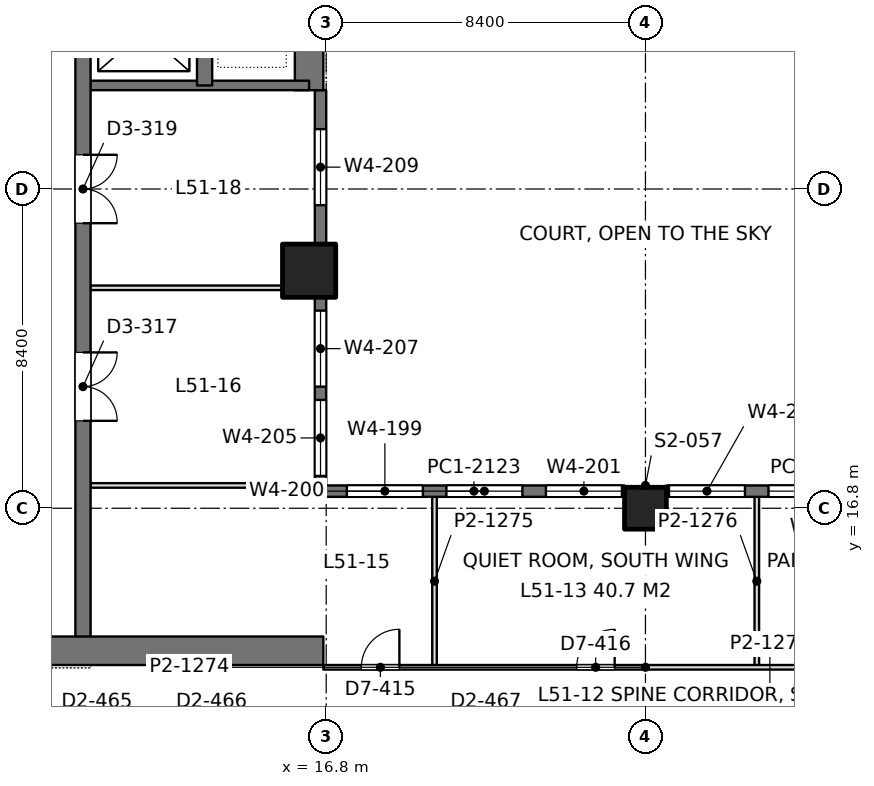
"""IFC4 building model, lengths in metres.
Left out: names, types, materials, properties, quantities, classifications, styles, units other than length and angle.
Written with IfcOpenShell. Run it as: python <this file> out.ifc"""

import sys

from ifc_helpers import new_model, si_unit, direction, frame, frame_2d, origin, origin_2d, place, context, subcontext, project, spatial, rectangle, extrude, element, fill, save


model = new_model("IFC4")
c1 = context("Model", 3, precision=1e-05, world=origin(), true_north=direction((0.0, 1.0)))
c2 = subcontext(c1, "Body", "Model", "MODEL_VIEW")
j1 = project(units=[si_unit("LENGTHUNIT", "METRE"), si_unit("PLANEANGLEUNIT", "RADIAN")], contexts=[c1])
p1 = place(None, origin())
s1 = spatial("IfcSite", under=j1, at=p1, CompositionType="ELEMENT")
p2 = place(p1, origin())
s2 = spatial("IfcBuilding", under=s1, at=p2, CompositionType="ELEMENT")
p3 = place(p2, frame((0.0, 0.0, 223.8)))
s3 = spatial("IfcBuildingStorey", under=s2, at=p3, CompositionType="ELEMENT", Elevation=223.8)
p4 = place(p3, frame((25.2, 16.8, 0.0), z_axis=(0.0, 0.0, 1.0), x_axis=(1.0, 0.0, 0.0)))
e1 = element("IfcColumn", 1, at=p4, inside=s3, PredefinedType="COLUMN", context=c2, shape_type="SweptSolid", body=[
    extrude(rectangle(XDim=1.1, YDim=1.1, at=origin_2d()), origin(), (0.0, 0.0, 1.0), 4.2),
])
p5 = place(p3, frame((16.35, 23.05, 0.0), z_axis=(0.0, 0.0, 1.0), x_axis=(1.0, 0.0, 0.0)))
e2 = element("IfcColumn", 2, at=p5, inside=s3, PredefinedType="COLUMN", context=c2, shape_type="SweptSolid", body=[
    extrude(rectangle(XDim=1.4, YDim=1.4, at=origin_2d()), origin(), (0.0, 0.0, 1.0), 4.2),
])
p6 = place(p3, frame((-1.125, 13.05, 0.0), z_axis=(0.0, 0.0, 1.0), x_axis=(1.0, 0.0, 0.0)))
e3 = element("IfcWall", 3, at=p6, inside=s3, PredefinedType="SHEAR", context=c2, shape_type="SweptSolid", body=[
    extrude(rectangle(XDim=17.85, YDim=0.75, at=frame_2d((8.925, 0.0))), origin(), (0.0, 0.0, 1.0), 4.2),
])
p7 = place(p6, frame((8.875, 0.0, 0.0)))
e4 = element("IfcOpeningElement", 4, at=p7, cuts=e3, PredefinedType="OPENING", context=c2, shape_type="SweptSolid", body=[
    extrude(rectangle(XDim=1.8, YDim=2.4, at=frame_2d((0.9, 1.2))), frame((0.0, 0.385, 0.0), z_axis=(0.0, -1.0, 0.0), x_axis=(1.0, 0.0, 0.0)), (0.0, 0.0, 1.0), 0.77),
])
p8 = place(p3, frame((16.35, 27.8, 0.0), z_axis=(0.0, 0.0, 1.0), x_axis=(0.0, 1.0, 0.0)))
e5 = element("IfcWall", 5, at=p8, inside=s3, PredefinedType="SHEAR", context=c2, shape_type="SweptSolid", body=[
    extrude(rectangle(XDim=9.55, YDim=0.75, at=frame_2d((4.775, 0.0))), origin(), (0.0, 0.0, 1.0), 4.2),
])
p9 = place(p3, frame((10.4, 13.05, 0.0), z_axis=(0.0, 0.0, 1.0), x_axis=(0.0, 1.0, 0.0)))
e6 = element("IfcWall", 6, at=p9, inside=s3, PredefinedType="SHEAR", context=c2, shape_type="SweptSolid", body=[
    extrude(rectangle(XDim=24.3, YDim=0.4, at=frame_2d((12.15, 0.0))), origin(), (0.0, 0.0, 1.0), 4.2),
])
p10 = place(p9, frame((15.75, 0.0, 0.0)))
e7 = element("IfcOpeningElement", 7, at=p10, cuts=e6, PredefinedType="OPENING", context=c2, shape_type="SweptSolid", body=[
    extrude(rectangle(XDim=1.1, YDim=2.2, at=frame_2d((0.55, 1.1))), frame((0.0, 0.21, 0.0), z_axis=(0.0, -1.0, 0.0), x_axis=(1.0, 0.0, 0.0)), (0.0, 0.0, 1.0), 0.42),
])
p11 = place(p9, frame((18.6, 0.0, 0.0)))
e8 = element("IfcOpeningElement", 8, at=p11, cuts=e6, PredefinedType="OPENING", context=c2, shape_type="SweptSolid", body=[
    extrude(rectangle(XDim=1.1, YDim=2.2, at=frame_2d((0.55, 1.1))), frame((0.0, 0.21, 0.0), z_axis=(0.0, -1.0, 0.0), x_axis=(1.0, 0.0, 0.0)), (0.0, 0.0, 1.0), 0.42),
])
p12 = place(p9, frame((21.45, 0.0, 0.0)))
e9 = element("IfcOpeningElement", 9, at=p12, cuts=e6, PredefinedType="OPENING", context=c2, shape_type="SweptSolid", body=[
    extrude(rectangle(XDim=1.1, YDim=2.2, at=frame_2d((0.55, 1.1))), frame((0.0, 0.21, 0.0), z_axis=(0.0, -1.0, 0.0), x_axis=(1.0, 0.0, 0.0)), (0.0, 0.0, 1.0), 0.42),
])
p13 = place(p9, frame((6.05, 0.0, 0.0)))
e10 = element("IfcOpeningElement", 10, at=p13, cuts=e6, PredefinedType="OPENING", context=c2, shape_type="SweptSolid", body=[
    extrude(rectangle(XDim=1.8, YDim=2.4, at=frame_2d((0.9, 1.2))), frame((0.0, 0.21, 0.0), z_axis=(0.0, -1.0, 0.0), x_axis=(1.0, 0.0, 0.0)), (0.0, 0.0, 1.0), 0.42),
])
p14 = place(p9, frame((11.25, 0.0, 0.0)))
e11 = element("IfcOpeningElement", 11, at=p14, cuts=e6, PredefinedType="OPENING", context=c2, shape_type="SweptSolid", body=[
    extrude(rectangle(XDim=1.8, YDim=2.4, at=frame_2d((0.9, 1.2))), frame((0.0, 0.21, 0.0), z_axis=(0.0, -1.0, 0.0), x_axis=(1.0, 0.0, 0.0)), (0.0, 0.0, 1.0), 0.42),
])
p15 = place(p3, frame((13.6, 27.925, 0.0), z_axis=(0.0, 0.0, 1.0), x_axis=(0.0, 1.0, 0.0)))
e12 = element("IfcWall", 12, at=p15, inside=s3, PredefinedType="SHEAR", context=c2, shape_type="SweptSolid", body=[
    extrude(rectangle(XDim=9.425, YDim=0.4, at=frame_2d((4.712, 0.0))), origin(), (0.0, 0.0, 1.0), 4.2),
])
p16 = place(p3, frame((10.4, 27.925, 0.0), z_axis=(0.0, 0.0, 1.0), x_axis=(1.0, 0.0, 0.0)))
e13 = element("IfcWall", 13, at=p16, inside=s3, PredefinedType="SHEAR", context=c2, shape_type="SweptSolid", body=[
    extrude(rectangle(XDim=5.95, YDim=0.25, at=frame_2d((2.975, 0.0))), origin(), (0.0, 0.0, 1.0), 4.2),
])
p17 = place(p3, frame((16.65, 17.1, 0.0), z_axis=(0.0, 0.0, 1.0), x_axis=(0.0, 1.0, 0.0)))
e14 = element("IfcWall", 14, at=p17, inside=s3, PredefinedType="SOLIDWALL", context=c2, shape_type="SweptSolid", body=[
    extrude(rectangle(XDim=10.7, YDim=0.3, at=frame_2d((5.35, 0.0))), origin(), (0.0, 0.0, 1.0), 4.05),
])
p18 = place(p17, frame((0.55, 0.0, 0.9)))
e15 = element("IfcOpeningElement", 15, at=p18, cuts=e14, PredefinedType="OPENING", context=c2, shape_type="SweptSolid", body=[
    extrude(rectangle(XDim=2.0, YDim=1.9, at=frame_2d((1.0, 0.95))), frame((0.0, 0.16, 0.0), z_axis=(0.0, -1.0, 0.0), x_axis=(1.0, 0.0, 0.0)), (0.0, 0.0, 1.0), 0.32),
])
p19 = place(p17, frame((2.9, 0.0, 0.9)))
e16 = element("IfcOpeningElement", 16, at=p19, cuts=e14, PredefinedType="OPENING", context=c2, shape_type="SweptSolid", body=[
    extrude(rectangle(XDim=2.0, YDim=1.9, at=frame_2d((1.0, 0.95))), frame((0.0, 0.16, 0.0), z_axis=(0.0, -1.0, 0.0), x_axis=(1.0, 0.0, 0.0)), (0.0, 0.0, 1.0), 0.32),
])
p20 = place(p17, frame((7.675, 0.0, 0.9)))
e17 = element("IfcOpeningElement", 17, at=p20, cuts=e14, PredefinedType="OPENING", context=c2, shape_type="SweptSolid", body=[
    extrude(rectangle(XDim=2.0, YDim=1.9, at=frame_2d((1.0, 0.95))), frame((0.0, 0.16, 0.0), z_axis=(0.0, -1.0, 0.0), x_axis=(1.0, 0.0, 0.0)), (0.0, 0.0, 1.0), 0.32),
])
p21 = place(p3, frame((16.725, 17.25, 0.0), z_axis=(0.0, 0.0, 1.0), x_axis=(1.0, 0.0, 0.0)))
e18 = element("IfcWall", 18, at=p21, inside=s3, PredefinedType="SOLIDWALL", context=c2, shape_type="SweptSolid", body=[
    extrude(rectangle(XDim=7.925, YDim=0.3, at=frame_2d((3.962, 0.0))), origin(), (0.0, 0.0, 1.0), 4.05),
])
p22 = place(p21, frame((0.619, 0.0, 0.9)))
e19 = element("IfcOpeningElement", 19, at=p22, cuts=e18, PredefinedType="OPENING", context=c2, shape_type="SweptSolid", body=[
    extrude(rectangle(XDim=2.0, YDim=1.9, at=frame_2d((1.0, 0.95))), frame((0.0, 0.16, 0.0), z_axis=(0.0, -1.0, 0.0), x_axis=(1.0, 0.0, 0.0)), (0.0, 0.0, 1.0), 0.32),
])
p23 = place(p21, frame((3.238, 0.0, 0.9)))
e20 = element("IfcOpeningElement", 20, at=p23, cuts=e18, PredefinedType="OPENING", context=c2, shape_type="SweptSolid", body=[
    extrude(rectangle(XDim=2.0, YDim=1.9, at=frame_2d((1.0, 0.95))), frame((0.0, 0.16, 0.0), z_axis=(0.0, -1.0, 0.0), x_axis=(1.0, 0.0, 0.0)), (0.0, 0.0, 1.0), 0.32),
])
p24 = place(p21, frame((5.856, 0.0, 0.9)))
e21 = element("IfcOpeningElement", 21, at=p24, cuts=e18, PredefinedType="OPENING", context=c2, shape_type="SweptSolid", body=[
    extrude(rectangle(XDim=2.0, YDim=1.9, at=frame_2d((1.0, 0.95))), frame((0.0, 0.16, 0.0), z_axis=(0.0, -1.0, 0.0), x_axis=(1.0, 0.0, 0.0)), (0.0, 0.0, 1.0), 0.32),
])
p25 = place(p3, frame((25.75, 17.25, 0.0), z_axis=(0.0, 0.0, 1.0), x_axis=(1.0, 0.0, 0.0)))
e22 = element("IfcWall", 22, at=p25, inside=s3, PredefinedType="SOLIDWALL", context=c2, shape_type="SweptSolid", body=[
    extrude(rectangle(XDim=7.925, YDim=0.3, at=frame_2d((3.962, 0.0))), origin(), (0.0, 0.0, 1.0), 4.05),
])
p26 = place(p25, frame((0.069, 0.0, 0.9)))
e23 = element("IfcOpeningElement", 23, at=p26, cuts=e22, PredefinedType="OPENING", context=c2, shape_type="SweptSolid", body=[
    extrude(rectangle(XDim=2.0, YDim=1.9, at=frame_2d((1.0, 0.95))), frame((0.0, 0.16, 0.0), z_axis=(0.0, -1.0, 0.0), x_axis=(1.0, 0.0, 0.0)), (0.0, 0.0, 1.0), 0.32),
])
p27 = place(p25, frame((2.688, 0.0, 0.9)))
e24 = element("IfcOpeningElement", 24, at=p27, cuts=e22, PredefinedType="OPENING", context=c2, shape_type="SweptSolid", body=[
    extrude(rectangle(XDim=2.0, YDim=1.9, at=frame_2d((1.0, 0.95))), frame((0.0, 0.16, 0.0), z_axis=(0.0, -1.0, 0.0), x_axis=(1.0, 0.0, 0.0)), (0.0, 0.0, 1.0), 0.32),
])
p28 = place(p25, frame((5.306, 0.0, 0.9)))
e25 = element("IfcOpeningElement", 25, at=p28, cuts=e22, PredefinedType="OPENING", context=c2, shape_type="SweptSolid", body=[
    extrude(rectangle(XDim=2.0, YDim=1.9, at=frame_2d((1.0, 0.95))), frame((0.0, 0.16, 0.0), z_axis=(0.0, -1.0, 0.0), x_axis=(1.0, 0.0, 0.0)), (0.0, 0.0, 1.0), 0.32),
])
p29 = place(p3, frame((10.598, 17.4, 0.0), z_axis=(0.0, 0.0, 1.0), x_axis=(1.0, 0.0, 0.0)))
e26 = element("IfcWall", 26, at=p29, inside=s3, PredefinedType="PARTITIONING", context=c2, shape_type="SweptSolid", body=[
    extrude(rectangle(XDim=5.904, YDim=0.12, at=frame_2d((2.952, 0.0))), origin(), (0.0, 0.0, 1.0), 3.55),
])
p30 = place(p3, frame((10.598, 22.6, 0.0), z_axis=(0.0, 0.0, 1.0), x_axis=(1.0, 0.0, 0.0)))
e27 = element("IfcWall", 27, at=p30, inside=s3, PredefinedType="PARTITIONING", context=c2, shape_type="SweptSolid", body=[
    extrude(rectangle(XDim=5.053, YDim=0.12, at=frame_2d((2.526, 0.0))), origin(), (0.0, 0.0, 1.0), 4.05),
])
for number, where, z_axis, x_axis in (
    (28, (19.65, 12.658, 0.0), (0.0, 0.0, 1.0), (0.0, 1.0, 0.0)),
    (29, (28.13, 12.658, 0.0), (0.0, 0.0, 1.0), (0.0, 1.0, 0.0)),
):
    element("IfcWall", number, at=place(p3, frame(where, z_axis=z_axis, x_axis=x_axis)), inside=s3, PredefinedType="PARTITIONING", context=c2, shape_type="SweptSolid", body=[
        extrude(rectangle(XDim=4.444, YDim=0.12, at=frame_2d((2.222, 0.0))), origin(), (0.0, 0.0, 1.0), 3.36),
    ])
p31 = place(p3, frame((16.725, 12.615, 0.0), z_axis=(0.0, 0.0, 1.0), x_axis=(1.0, 0.0, 0.0)))
e30 = element("IfcWall", 30, at=p31, inside=s3, PredefinedType="PARTITIONING", context=c2, shape_type="SweptSolid", body=[
    extrude(rectangle(XDim=16.95, YDim=0.12, at=frame_2d((8.475, 0.0))), origin(), (0.0, 0.0, 1.0), 3.55),
])
p32 = place(p31, frame((1.0, 0.0, 0.0)))
e31 = element("IfcOpeningElement", 31, at=p32, cuts=e30, PredefinedType="OPENING", context=c2, shape_type="SweptSolid", body=[
    extrude(rectangle(XDim=1.0, YDim=2.4, at=frame_2d((0.5, 1.2))), frame((0.0, 0.07, 0.0), z_axis=(0.0, -1.0, 0.0), x_axis=(1.0, 0.0, 0.0)), (0.0, 0.0, 1.0), 0.14),
])
p33 = place(p31, frame((6.665, 0.0, 0.0)))
e32 = element("IfcOpeningElement", 32, at=p33, cuts=e30, PredefinedType="OPENING", context=c2, shape_type="SweptSolid", body=[
    extrude(rectangle(XDim=1.0, YDim=2.4, at=frame_2d((0.5, 1.2))), frame((0.0, 0.07, 0.0), z_axis=(0.0, -1.0, 0.0), x_axis=(1.0, 0.0, 0.0)), (0.0, 0.0, 1.0), 0.14),
])
p34 = place(p31, frame((13.64, 0.0, 0.0)))
e33 = element("IfcOpeningElement", 33, at=p34, cuts=e30, PredefinedType="OPENING", context=c2, shape_type="SweptSolid", body=[
    extrude(rectangle(XDim=1.0, YDim=2.4, at=frame_2d((0.5, 1.2))), frame((0.0, 0.07, 0.0), z_axis=(0.0, -1.0, 0.0), x_axis=(1.0, 0.0, 0.0)), (0.0, 0.0, 1.0), 0.14),
])
p35 = place(p18, origin())
e34 = element("IfcWindow", 34, at=p35, inside=s3, PartitioningType="SINGLE_PANEL", PredefinedType="WINDOW", context=c2, shape_type="SweptSolid", body=[
    extrude(rectangle(XDim=2.0, YDim=1.9, at=frame_2d((1.0, 0.95))), frame((0.0, 0.03, 0.0), z_axis=(0.0, -1.0, 0.0), x_axis=(1.0, 0.0, 0.0)), (0.0, 0.0, 1.0), 0.06),
])
fill(e15, e34)
p36 = place(p19, origin())
e35 = element("IfcWindow", 35, at=p36, inside=s3, PartitioningType="SINGLE_PANEL", PredefinedType="WINDOW", context=c2, shape_type="SweptSolid", body=[
    extrude(rectangle(XDim=2.0, YDim=1.9, at=frame_2d((1.0, 0.95))), frame((0.0, 0.03, 0.0), z_axis=(0.0, -1.0, 0.0), x_axis=(1.0, 0.0, 0.0)), (0.0, 0.0, 1.0), 0.06),
])
fill(e16, e35)
p37 = place(p20, origin())
e36 = element("IfcWindow", 36, at=p37, inside=s3, PartitioningType="SINGLE_PANEL", PredefinedType="WINDOW", context=c2, shape_type="SweptSolid", body=[
    extrude(rectangle(XDim=2.0, YDim=1.9, at=frame_2d((1.0, 0.95))), frame((0.0, 0.03, 0.0), z_axis=(0.0, -1.0, 0.0), x_axis=(1.0, 0.0, 0.0)), (0.0, 0.0, 1.0), 0.06),
])
fill(e17, e36)
p38 = place(p22, origin())
e37 = element("IfcWindow", 37, at=p38, inside=s3, PartitioningType="SINGLE_PANEL", PredefinedType="WINDOW", context=c2, shape_type="SweptSolid", body=[
    extrude(rectangle(XDim=2.0, YDim=1.9, at=frame_2d((1.0, 0.95))), frame((0.0, 0.03, 0.0), z_axis=(0.0, -1.0, 0.0), x_axis=(1.0, 0.0, 0.0)), (0.0, 0.0, 1.0), 0.06),
])
fill(e19, e37)
p39 = place(p23, origin())
e38 = element("IfcWindow", 38, at=p39, inside=s3, PartitioningType="SINGLE_PANEL", PredefinedType="WINDOW", context=c2, shape_type="SweptSolid", body=[
    extrude(rectangle(XDim=2.0, YDim=1.9, at=frame_2d((1.0, 0.95))), frame((0.0, 0.03, 0.0), z_axis=(0.0, -1.0, 0.0), x_axis=(1.0, 0.0, 0.0)), (0.0, 0.0, 1.0), 0.06),
])
fill(e20, e38)
p40 = place(p24, origin())
e39 = element("IfcWindow", 39, at=p40, inside=s3, PartitioningType="SINGLE_PANEL", PredefinedType="WINDOW", context=c2, shape_type="SweptSolid", body=[
    extrude(rectangle(XDim=2.0, YDim=1.9, at=frame_2d((1.0, 0.95))), frame((0.0, 0.03, 0.0), z_axis=(0.0, -1.0, 0.0), x_axis=(1.0, 0.0, 0.0)), (0.0, 0.0, 1.0), 0.06),
])
fill(e21, e39)
p41 = place(p26, origin())
e40 = element("IfcWindow", 40, at=p41, inside=s3, PartitioningType="SINGLE_PANEL", PredefinedType="WINDOW", context=c2, shape_type="SweptSolid", body=[
    extrude(rectangle(XDim=2.0, YDim=1.9, at=frame_2d((1.0, 0.95))), frame((0.0, 0.03, 0.0), z_axis=(0.0, -1.0, 0.0), x_axis=(1.0, 0.0, 0.0)), (0.0, 0.0, 1.0), 0.06),
])
fill(e23, e40)
p42 = place(p27, origin())
e41 = element("IfcWindow", 41, at=p42, inside=s3, PartitioningType="SINGLE_PANEL", PredefinedType="WINDOW", context=c2, shape_type="SweptSolid", body=[
    extrude(rectangle(XDim=2.0, YDim=1.9, at=frame_2d((1.0, 0.95))), frame((0.0, 0.03, 0.0), z_axis=(0.0, -1.0, 0.0), x_axis=(1.0, 0.0, 0.0)), (0.0, 0.0, 1.0), 0.06),
])
fill(e24, e41)
p43 = place(p13, frame((1.8, 0.0, 0.0), z_axis=(0.0, 0.0, 1.0), x_axis=(-1.0, 0.0, 0.0)))
e42 = element("IfcDoor", 42, at=p43, inside=s3, OperationType="DOUBLE_DOOR_SINGLE_SWING", PredefinedType="DOOR", context=c2, shape_type="SweptSolid", body=[
    extrude(rectangle(XDim=1.8, YDim=2.4, at=frame_2d((0.9, 1.2))), frame((0.0, 0.025, 0.0), z_axis=(0.0, -1.0, 0.0), x_axis=(1.0, 0.0, 0.0)), (0.0, 0.0, 1.0), 0.05),
])
fill(e10, e42)
p44 = place(p14, frame((1.8, 0.0, 0.0), z_axis=(0.0, 0.0, 1.0), x_axis=(-1.0, 0.0, 0.0)))
e43 = element("IfcDoor", 43, at=p44, inside=s3, OperationType="DOUBLE_DOOR_SINGLE_SWING", PredefinedType="DOOR", context=c2, shape_type="SweptSolid", body=[
    extrude(rectangle(XDim=1.8, YDim=2.4, at=frame_2d((0.9, 1.2))), frame((0.0, 0.025, 0.0), z_axis=(0.0, -1.0, 0.0), x_axis=(1.0, 0.0, 0.0)), (0.0, 0.0, 1.0), 0.05),
])
fill(e11, e43)
p45 = place(p32, origin())
e44 = element("IfcDoor", 44, at=p45, inside=s3, OperationType="SINGLE_SWING_RIGHT", PredefinedType="DOOR", context=c2, shape_type="SweptSolid", body=[
    extrude(rectangle(XDim=1.0, YDim=2.4, at=frame_2d((0.5, 1.2))), frame((0.0, 0.025, 0.0), z_axis=(0.0, -1.0, 0.0), x_axis=(1.0, 0.0, 0.0)), (0.0, 0.0, 1.0), 0.05),
])
fill(e31, e44)
p46 = place(p33, origin())
e45 = element("IfcDoor", 45, at=p46, inside=s3, OperationType="SINGLE_SWING_RIGHT", PredefinedType="DOOR", context=c2, shape_type="SweptSolid", body=[
    extrude(rectangle(XDim=1.0, YDim=2.4, at=frame_2d((0.5, 1.2))), frame((0.0, 0.025, 0.0), z_axis=(0.0, -1.0, 0.0), x_axis=(1.0, 0.0, 0.0)), (0.0, 0.0, 1.0), 0.05),
])
fill(e32, e45)
save(model, sys.argv[1])
